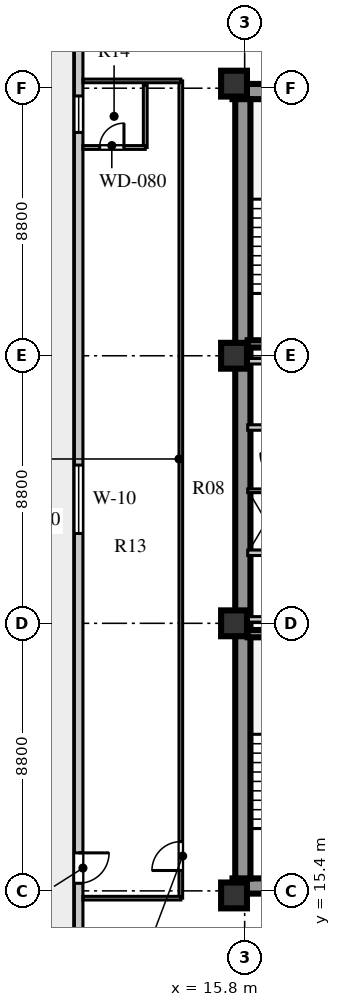
"""IFC4 building model, lengths in metres.
Left out: names, types, materials, properties, quantities, classifications, styles, units other than length and angle.
Written with IfcOpenShell. Run it as: python <this file> out.ifc"""

import sys

from ifc_helpers import new_model, si_unit, direction, frame, frame_2d, origin, origin_2d, place, context, subcontext, project, spatial, rectangle, extrude, element, fill, save


model = new_model("IFC4")
c1 = context("Model", 3, precision=1e-05, world=origin(), true_north=direction((0.0, 1.0)))
c2 = subcontext(c1, "Body", "Model", "MODEL_VIEW")
j1 = project(units=[si_unit("LENGTHUNIT", "METRE"), si_unit("PLANEANGLEUNIT", "RADIAN")], contexts=[c1])
p1 = place(None, origin())
s1 = spatial("IfcSite", under=j1, at=p1, CompositionType="ELEMENT")
p2 = place(p1, origin())
s2 = spatial("IfcBuilding", under=s1, at=p2, CompositionType="ELEMENT")
p3 = place(p2, frame((0.0, 0.0, 104.0)))
s3 = spatial("IfcBuildingStorey", under=s2, at=p3, CompositionType="ELEMENT", Elevation=104.0)
for number, where, z_axis, x_axis in (
    (1, (15.4, 15.56, 0.0), (0.0, 0.0, 1.0), (1.0, 0.0, 0.0)),
    (2, (15.4, 41.69, 0.0), (0.0, 0.0, 1.0), (1.0, 0.0, 0.0)),
):
    element("IfcWall", number, at=place(p3, frame(where, z_axis=z_axis, x_axis=x_axis)), inside=s3, PredefinedType="SHEAR", context=c2, shape_type="SweptSolid", body=[
        extrude(rectangle(XDim=9.68, YDim=0.5, at=frame_2d((4.84, 0.0))), origin(), (0.0, 0.0, 1.0), 3.6),
    ])
p4 = place(p3, frame((15.74, 15.81, 0.0), z_axis=(0.0, 0.0, 1.0), x_axis=(0.0, 1.0, 0.0)))
e3 = element("IfcWall", 3, at=p4, inside=s3, PredefinedType="SHEAR", context=c2, shape_type="SweptSolid", body=[
    extrude(rectangle(XDim=25.63, YDim=0.5, at=frame_2d((12.815, 0.0))), origin(), (0.0, 0.0, 1.0), 3.6),
])
for number, where, z_axis, x_axis in (
    (4, (15.45, 15.25, 0.0), (0.0, 0.0, 1.0), (1.0, 0.0, 0.0)),
    (5, (15.45, 24.2, 0.0), (0.0, 0.0, 1.0), (1.0, 0.0, 0.0)),
    (6, (15.45, 33.0, 0.0), (0.0, 0.0, 1.0), (1.0, 0.0, 0.0)),
    (7, (15.45, 41.95, 0.0), (0.0, 0.0, 1.0), (1.0, 0.0, 0.0)),
):
    element("IfcColumn", number, at=place(p3, frame(where, z_axis=z_axis, x_axis=x_axis)), inside=s3, PredefinedType="COLUMN", context=c2, shape_type="SweptSolid", body=[
        extrude(rectangle(XDim=0.85, YDim=0.85, at=origin_2d()), origin(), (0.0, 0.0, 1.0), 3.6),
    ])
p5 = place(p3, frame((10.34, 43.87, 0.0), z_axis=(0.0, 0.0, 1.0), x_axis=(0.0, -1.0, 0.0)))
e8 = element("IfcWall", 8, at=p5, inside=s3, PredefinedType="STANDARD", context=c2, shape_type="SweptSolid", body=[
    extrude(rectangle(XDim=30.54, YDim=0.28, at=frame_2d((15.27, 0.0))), origin(), (0.0, 0.0, 1.0), 3.6),
])
p6 = place(p5, frame((27.22, 0.0, 0.0)))
e9 = element("IfcOpeningElement", 9, at=p6, cuts=e8, PredefinedType="OPENING", context=c2, shape_type="SweptSolid", body=[
    extrude(rectangle(XDim=1.0, YDim=2.05, at=frame_2d((0.5, 1.025))), frame((0.0, 0.15, 0.0), z_axis=(0.0, -1.0, 0.0), x_axis=(1.0, 0.0, 0.0)), (0.0, 0.0, 1.0), 0.3),
])
p7 = place(p5, frame((14.465, 0.0, 0.8)))
e10 = element("IfcOpeningElement", 10, at=p7, cuts=e8, PredefinedType="OPENING", context=c2, shape_type="SweptSolid", body=[
    extrude(rectangle(XDim=2.25, YDim=2.0, at=frame_2d((1.125, 1.0))), frame((0.0, 0.15, 0.0), z_axis=(0.0, -1.0, 0.0), x_axis=(1.0, 0.0, 0.0)), (0.0, 0.0, 1.0), 0.3),
])
p8 = place(p5, frame((2.325, 0.0, 0.8)))
e11 = element("IfcOpeningElement", 11, at=p8, cuts=e8, PredefinedType="OPENING", context=c2, shape_type="SweptSolid", body=[
    extrude(rectangle(XDim=1.2, YDim=1.75, at=frame_2d((0.6, 0.875))), frame((0.0, 0.15, 0.0), z_axis=(0.0, -1.0, 0.0), x_axis=(1.0, 0.0, 0.0)), (0.0, 0.0, 1.0), 0.3),
])
p9 = place(p3, frame((15.9, 23.86, 0.0), z_axis=(0.0, 0.0, 1.0), x_axis=(1.0, 0.0, 0.0)))
e12 = element("IfcWall", 12, at=p9, inside=s3, PredefinedType="SHEAR", context=c2, shape_type="SweptSolid", body=[
    extrude(rectangle(XDim=3.52, YDim=0.24, at=frame_2d((1.76, 0.0))), origin(), (0.0, 0.0, 1.0), 3.85),
])
p10 = place(p3, frame((15.9, 26.52, 0.0), z_axis=(0.0, 0.0, 1.0), x_axis=(1.0, 0.0, 0.0)))
e13 = element("IfcWall", 13, at=p10, inside=s3, PredefinedType="SOLIDWALL", context=c2, shape_type="SweptSolid", body=[
    extrude(rectangle(XDim=8.68, YDim=0.18, at=frame_2d((4.34, 0.0))), origin(), (0.0, 0.0, 1.0), 3.6),
])
p11 = place(p3, frame((15.9, 24.33, 0.0), z_axis=(0.0, 0.0, 1.0), x_axis=(1.0, 0.0, 0.0)))
e14 = element("IfcWall", 14, at=p11, inside=s3, PredefinedType="SOLIDWALL", context=c2, shape_type="SweptSolid", body=[
    extrude(rectangle(XDim=8.68, YDim=0.18, at=frame_2d((4.34, 0.0))), origin(), (0.0, 0.0, 1.0), 2.95),
])
p12 = place(p3, frame((15.9, 28.56, 0.0), z_axis=(0.0, 0.0, 1.0), x_axis=(1.0, 0.0, 0.0)))
e15 = element("IfcWall", 15, at=p12, inside=s3, PredefinedType="PARTITIONING", context=c2, shape_type="SweptSolid", body=[
    extrude(rectangle(XDim=1.2, YDim=0.12, at=frame_2d((0.6, 0.0))), origin(), (0.0, 0.0, 1.0), 3.6),
])
p13 = place(p3, frame((15.9, 30.64, 0.0), z_axis=(0.0, 0.0, 1.0), x_axis=(1.0, 0.0, 0.0)))
e16 = element("IfcWall", 16, at=p13, inside=s3, PredefinedType="SOLIDWALL", context=c2, shape_type="SweptSolid", body=[
    extrude(rectangle(XDim=8.68, YDim=0.18, at=frame_2d((4.34, 0.0))), origin(), (0.0, 0.0, 1.0), 3.6),
])
p14 = place(p13, frame((1.76, 0.0, 0.0)))
e17 = element("IfcOpeningElement", 17, at=p14, cuts=e16, PredefinedType="OPENING", context=c2, shape_type="SweptSolid", body=[
    extrude(rectangle(XDim=1.0, YDim=2.1, at=frame_2d((0.5, 1.05))), frame((0.0, 0.1, 0.0), z_axis=(0.0, -1.0, 0.0), x_axis=(1.0, 0.0, 0.0)), (0.0, 0.0, 1.0), 0.2),
])
p15 = place(p13, frame((3.6, 0.0, 0.0)))
e18 = element("IfcOpeningElement", 18, at=p15, cuts=e16, PredefinedType="OPENING", context=c2, shape_type="SweptSolid", body=[
    extrude(rectangle(XDim=1.0, YDim=2.1, at=frame_2d((0.5, 1.05))), frame((0.0, 0.1, 0.0), z_axis=(0.0, -1.0, 0.0), x_axis=(1.0, 0.0, 0.0)), (0.0, 0.0, 1.0), 0.2),
])
p16 = place(p13, frame((5.44, 0.0, 0.0)))
e19 = element("IfcOpeningElement", 19, at=p16, cuts=e16, PredefinedType="OPENING", context=c2, shape_type="SweptSolid", body=[
    extrude(rectangle(XDim=1.0, YDim=2.1, at=frame_2d((0.5, 1.05))), frame((0.0, 0.1, 0.0), z_axis=(0.0, -1.0, 0.0), x_axis=(1.0, 0.0, 0.0)), (0.0, 0.0, 1.0), 0.2),
])
p17 = place(p13, frame((7.28, 0.0, 0.0)))
e20 = element("IfcOpeningElement", 20, at=p17, cuts=e16, PredefinedType="OPENING", context=c2, shape_type="SweptSolid", body=[
    extrude(rectangle(XDim=1.0, YDim=2.1, at=frame_2d((0.5, 1.05))), frame((0.0, 0.1, 0.0), z_axis=(0.0, -1.0, 0.0), x_axis=(1.0, 0.0, 0.0)), (0.0, 0.0, 1.0), 0.2),
])
p18 = place(p3, frame((15.9, 32.82, 0.0), z_axis=(0.0, 0.0, 1.0), x_axis=(1.0, 0.0, 0.0)))
e21 = element("IfcWall", 21, at=p18, inside=s3, PredefinedType="SOLIDWALL", context=c2, shape_type="SweptSolid", body=[
    extrude(rectangle(XDim=8.68, YDim=0.18, at=frame_2d((4.34, 0.0))), origin(), (0.0, 0.0, 1.0), 2.95),
])
p19 = place(p3, frame((15.9, 33.39, 0.0), z_axis=(0.0, 0.0, 1.0), x_axis=(1.0, 0.0, 0.0)))
e22 = element("IfcWall", 22, at=p19, inside=s3, PredefinedType="SHEAR", context=c2, shape_type="SweptSolid", body=[
    extrude(rectangle(XDim=3.52, YDim=0.24, at=frame_2d((1.76, 0.0))), origin(), (0.0, 0.0, 1.0), 3.85),
])
p20 = place(p3, frame((13.7, 15.16, 0.0), z_axis=(0.0, 0.0, 1.0), x_axis=(0.0, 1.0, 0.0)))
e23 = element("IfcWall", 23, at=p20, inside=s3, PredefinedType="PARTITIONING", context=c2, shape_type="SweptSolid", body=[
    extrude(rectangle(XDim=26.88, YDim=0.12, at=frame_2d((13.44, 0.0))), origin(), (0.0, 0.0, 1.0), 3.6),
])
p21 = place(p20, frame((0.91, 0.0, 0.0)))
e24 = element("IfcOpeningElement", 24, at=p21, cuts=e23, PredefinedType="OPENING", context=c2, shape_type="SweptSolid", body=[
    extrude(rectangle(XDim=0.95, YDim=2.1, at=frame_2d((0.475, 1.05))), frame((0.0, 0.07, 0.0), z_axis=(0.0, -1.0, 0.0), x_axis=(1.0, 0.0, 0.0)), (0.0, 0.0, 1.0), 0.14),
])
for number, where, z_axis, x_axis in (
    (25, (10.48, 15.16, 0.0), (0.0, 0.0, 1.0), (1.0, 0.0, 0.0)),
    (26, (10.48, 42.04, 0.0), (0.0, 0.0, 1.0), (1.0, 0.0, 0.0)),
):
    element("IfcWall", number, at=place(p3, frame(where, z_axis=z_axis, x_axis=x_axis)), inside=s3, PredefinedType="PARTITIONING", context=c2, shape_type="SweptSolid", body=[
        extrude(rectangle(XDim=3.22, YDim=0.12, at=frame_2d((1.61, 0.0))), origin(), (0.0, 0.0, 1.0), 3.1),
    ])
p22 = place(p3, frame((12.53, 39.85, 0.0), z_axis=(0.0, 0.0, 1.0), x_axis=(0.0, 1.0, 0.0)))
e27 = element("IfcWall", 27, at=p22, inside=s3, PredefinedType="PLUMBINGWALL", context=c2, shape_type="SweptSolid", body=[
    extrude(rectangle(XDim=2.05, YDim=0.125, at=frame_2d((1.025, 0.0))), origin(), (0.0, 0.0, 1.0), 3.6),
])
p23 = place(p3, frame((10.48, 39.85, 0.0), z_axis=(0.0, 0.0, 1.0), x_axis=(1.0, 0.0, 0.0)))
e28 = element("IfcWall", 28, at=p23, inside=s3, PredefinedType="PLUMBINGWALL", context=c2, shape_type="SweptSolid", body=[
    extrude(rectangle(XDim=2.05, YDim=0.125, at=frame_2d((1.025, 0.0))), origin(), (0.0, 0.0, 1.0), 3.6),
])
p24 = place(p23, frame((0.55, 0.0, 0.0)))
e29 = element("IfcOpeningElement", 29, at=p24, cuts=e28, PredefinedType="OPENING", context=c2, shape_type="SweptSolid", body=[
    extrude(rectangle(XDim=0.8, YDim=2.05, at=frame_2d((0.4, 1.025))), frame((0.0, 0.073, 0.0), z_axis=(0.0, -1.0, 0.0), x_axis=(1.0, 0.0, 0.0)), (0.0, 0.0, 1.0), 0.145),
])
p25 = place(p6, frame((1.0, 0.0, 0.0), z_axis=(0.0, 0.0, 1.0), x_axis=(-1.0, 0.0, 0.0)))
e30 = element("IfcDoor", 30, at=p25, inside=s3, OperationType="SINGLE_SWING_RIGHT", PredefinedType="DOOR", context=c2, shape_type="SweptSolid", body=[
    extrude(rectangle(XDim=1.0, YDim=2.05, at=frame_2d((0.5, 1.025))), frame((0.0, 0.025, 0.0), z_axis=(0.0, -1.0, 0.0), x_axis=(1.0, 0.0, 0.0)), (0.0, 0.0, 1.0), 0.05),
])
fill(e9, e30)
p26 = place(p7, origin())
e31 = element("IfcWindow", 31, at=p26, inside=s3, PartitioningType="SINGLE_PANEL", PredefinedType="WINDOW", context=c2, shape_type="SweptSolid", body=[
    extrude(rectangle(XDim=2.25, YDim=2.0, at=frame_2d((1.125, 1.0))), frame((0.0, 0.03, 0.0), z_axis=(0.0, -1.0, 0.0), x_axis=(1.0, 0.0, 0.0)), (0.0, 0.0, 1.0), 0.06),
])
fill(e10, e31)
p27 = place(p8, origin())
e32 = element("IfcWindow", 32, at=p27, inside=s3, PartitioningType="SINGLE_PANEL", PredefinedType="WINDOW", context=c2, shape_type="SweptSolid", body=[
    extrude(rectangle(XDim=1.2, YDim=1.75, at=frame_2d((0.6, 0.875))), frame((0.0, 0.03, 0.0), z_axis=(0.0, -1.0, 0.0), x_axis=(1.0, 0.0, 0.0)), (0.0, 0.0, 1.0), 0.06),
])
fill(e11, e32)
p28 = place(p21, origin())
e33 = element("IfcDoor", 33, at=p28, inside=s3, OperationType="SINGLE_SWING_LEFT", PredefinedType="DOOR", context=c2, shape_type="SweptSolid", body=[
    extrude(rectangle(XDim=0.95, YDim=2.1, at=frame_2d((0.475, 1.05))), frame((0.0, 0.025, 0.0), z_axis=(0.0, -1.0, 0.0), x_axis=(1.0, 0.0, 0.0)), (0.0, 0.0, 1.0), 0.05),
])
fill(e24, e33)
p29 = place(p24, frame((0.8, 0.0, 0.0), z_axis=(0.0, 0.0, 1.0), x_axis=(-1.0, 0.0, 0.0)))
e34 = element("IfcDoor", 34, at=p29, inside=s3, OperationType="SINGLE_SWING_LEFT", PredefinedType="DOOR", context=c2, shape_type="SweptSolid", body=[
    extrude(rectangle(XDim=0.8, YDim=2.05, at=frame_2d((0.4, 1.025))), frame((0.0, 0.025, 0.0), z_axis=(0.0, -1.0, 0.0), x_axis=(1.0, 0.0, 0.0)), (0.0, 0.0, 1.0), 0.05),
])
fill(e29, e34)
save(model, sys.argv[1])
